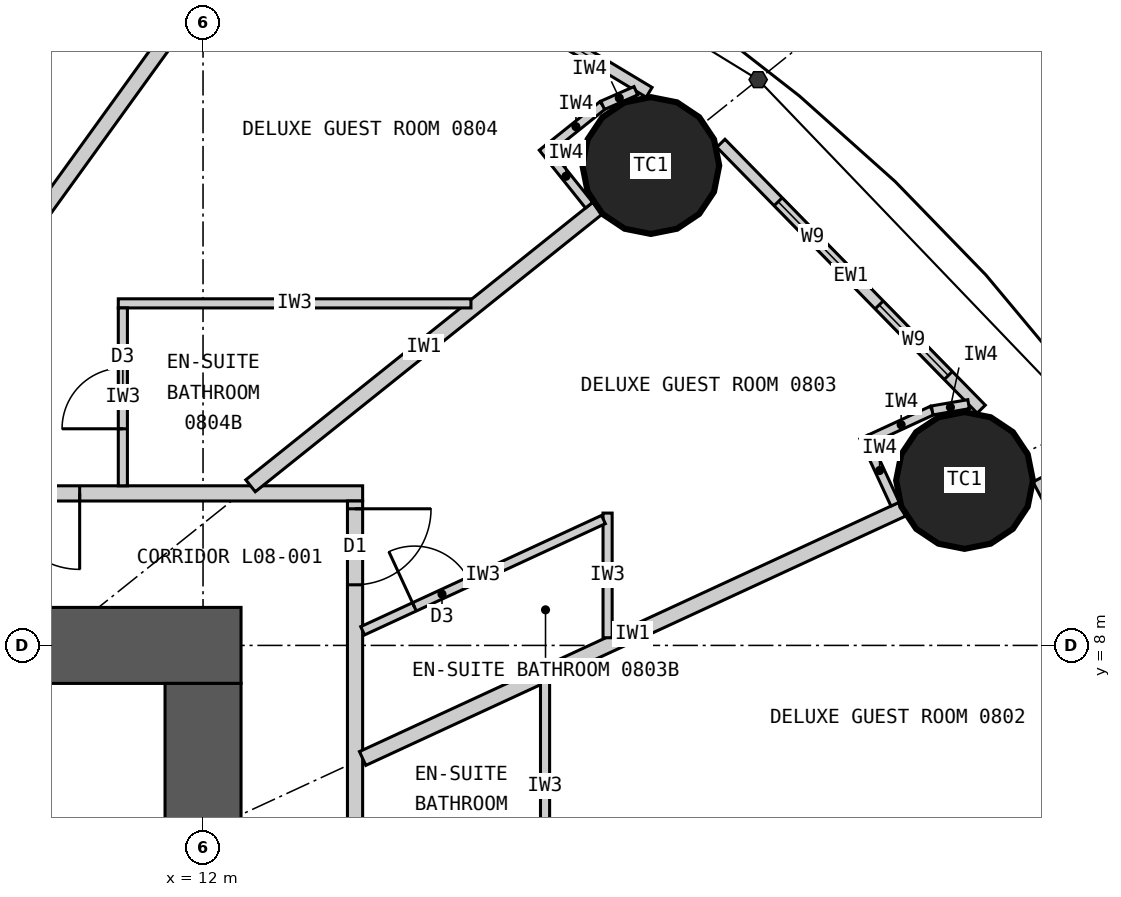
"""IFC4 building model, lengths in metres.
Left out: names, types, materials, properties, quantities, classifications, styles, units other than length and angle.
Written with IfcOpenShell. Run it as: python <this file> out.ifc"""

import sys

from ifc_helpers import new_model, si_unit, direction, frame, frame_2d, origin, origin_2d, place, context, subcontext, project, spatial, rectangle, circle, extrude, element, fill, save


model = new_model("IFC4")
c1 = context("Model", 3, precision=1e-05, world=origin(), true_north=direction((0.0, 1.0)))
c2 = subcontext(c1, "Body", "Model", "MODEL_VIEW")
j1 = project(units=[si_unit("LENGTHUNIT", "METRE"), si_unit("PLANEANGLEUNIT", "RADIAN")], contexts=[c1])
p1 = place(None, origin())
s1 = spatial("IfcSite", under=j1, at=p1, CompositionType="ELEMENT")
p2 = place(p1, origin())
s2 = spatial("IfcBuilding", under=s1, at=p2, CompositionType="ELEMENT")
p3 = place(p2, frame((0.0, 0.0, 39.3)))
s3 = spatial("IfcBuildingStorey", under=s2, at=p3, CompositionType="ELEMENT", Elevation=39.3)
for number, where, z_axis, x_axis in (
    (1, (22.019, 10.17, 0.0), (0.0, 0.0, 1.0), (1.0, 0.0, 0.0)),
    (2, (17.892, 14.313, 0.0), (0.0, 0.0, 1.0), (1.0, 0.0, 0.0)),
):
    element("IfcColumn", number, at=place(p3, frame(where, z_axis=z_axis, x_axis=x_axis)), inside=s3, PredefinedType="COLUMN", context=c2, shape_type="SweptSolid", body=[
        extrude(circle(Radius=0.9, at=origin_2d()), origin(), (0.0, 0.0, 1.0), 3.3),
    ])
p4 = place(p3, frame((-12.5, 8.0, 0.0), z_axis=(0.0, 0.0, 1.0), x_axis=(1.0, 0.0, 0.0)))
e3 = element("IfcWall", 3, at=p4, inside=s3, PredefinedType="SHEAR", context=c2, shape_type="SweptSolid", body=[
    extrude(rectangle(XDim=25.0, YDim=1.0, at=frame_2d((12.5, 0.0))), origin(), (0.0, 0.0, 1.0), 3.3),
])
p5 = place(p4, frame((11.2, 0.0, 0.0)))
e4 = element("IfcOpeningElement", 4, at=p5, cuts=e3, PredefinedType="OPENING", context=c2, shape_type="SweptSolid", body=[
    extrude(rectangle(XDim=1.2, YDim=2.2, at=frame_2d((0.6, 1.1))), frame((0.0, 0.51, 0.0), z_axis=(0.0, -1.0, 0.0), x_axis=(1.0, 0.0, 0.0)), (0.0, 0.0, 1.0), 1.02),
])
p6 = place(p4, frame((18.8, 0.0, 0.0)))
e5 = element("IfcOpeningElement", 5, at=p6, cuts=e3, PredefinedType="OPENING", context=c2, shape_type="SweptSolid", body=[
    extrude(rectangle(XDim=0.9, YDim=2.2, at=frame_2d((0.45, 1.1))), frame((0.0, 0.51, 0.0), z_axis=(0.0, -1.0, 0.0), x_axis=(1.0, 0.0, 0.0)), (0.0, 0.0, 1.0), 1.02),
])
p7 = place(p3, frame((12.0, -7.5, 0.0), z_axis=(0.0, 0.0, 1.0), x_axis=(0.0, 1.0, 0.0)))
e6 = element("IfcWall", 6, at=p7, inside=s3, PredefinedType="SHEAR", context=c2, shape_type="SweptSolid", body=[
    extrude(rectangle(XDim=15.0, YDim=1.0, at=frame_2d((7.5, 0.0))), origin(), (0.0, 0.0, 1.0), 3.3),
])
p8 = place(p7, frame((6.6, 0.0, 0.0)))
e7 = element("IfcOpeningElement", 7, at=p8, cuts=e6, PredefinedType="OPENING", context=c2, shape_type="SweptSolid", body=[
    extrude(rectangle(XDim=1.8, YDim=2.2, at=frame_2d((0.9, 1.1))), frame((0.0, 0.51, 0.0), z_axis=(0.0, -1.0, 0.0), x_axis=(1.0, 0.0, 0.0)), (0.0, 0.0, 1.0), 1.02),
])
p9 = place(p3, frame((25.139, 6.113, 0.0), z_axis=(0.0, 0.0, 1.0), x_axis=(-0.467303182954, 0.884097129959, 0.0)))
e8 = element("IfcWall", 8, at=p9, inside=s3, PredefinedType="ELEMENTEDWALL", context=c2, shape_type="SweptSolid", body=[
    extrude(rectangle(XDim=4.606, YDim=0.15, at=frame_2d((2.303, 0.0))), origin(), (0.0, 0.0, 1.0), 3.12),
])
p10 = place(p9, frame((0.531, 0.0, 0.9)))
e9 = element("IfcOpeningElement", 9, at=p10, cuts=e8, PredefinedType="OPENING", context=c2, shape_type="SweptSolid", body=[
    extrude(rectangle(XDim=1.3, YDim=1.9, at=frame_2d((0.65, 0.95))), frame((0.0, 0.085, 0.0), z_axis=(0.0, -1.0, 0.0), x_axis=(1.0, 0.0, 0.0)), (0.0, 0.0, 1.0), 0.17),
])
p11 = place(p9, frame((2.432, 0.0, 0.9)))
e10 = element("IfcOpeningElement", 10, at=p11, cuts=e8, PredefinedType="OPENING", context=c2, shape_type="SweptSolid", body=[
    extrude(rectangle(XDim=1.3, YDim=1.9, at=frame_2d((0.65, 0.95))), frame((0.0, 0.085, 0.0), z_axis=(0.0, -1.0, 0.0), x_axis=(1.0, 0.0, 0.0)), (0.0, 0.0, 1.0), 0.17),
])
p12 = place(p3, frame((22.239, 11.108, 0.0), z_axis=(0.0, 0.0, 1.0), x_axis=(-0.699612594083, 0.714522370679, 0.0)))
e11 = element("IfcWall", 11, at=p12, inside=s3, PredefinedType="ELEMENTEDWALL", context=c2, shape_type="SweptSolid", body=[
    extrude(rectangle(XDim=4.896, YDim=0.15, at=frame_2d((2.448, 0.0))), origin(), (0.0, 0.0, 1.0), 3.12),
])
p13 = place(p12, frame((0.619, 0.0, 0.9)))
e12 = element("IfcOpeningElement", 12, at=p13, cuts=e11, PredefinedType="OPENING", context=c2, shape_type="SweptSolid", body=[
    extrude(rectangle(XDim=1.3, YDim=1.9, at=frame_2d((0.65, 0.95))), frame((0.0, 0.085, 0.0), z_axis=(0.0, -1.0, 0.0), x_axis=(1.0, 0.0, 0.0)), (0.0, 0.0, 1.0), 0.17),
])
p14 = place(p12, frame((2.519, 0.0, 0.9)))
e13 = element("IfcOpeningElement", 13, at=p14, cuts=e11, PredefinedType="OPENING", context=c2, shape_type="SweptSolid", body=[
    extrude(rectangle(XDim=1.3, YDim=1.9, at=frame_2d((0.65, 0.95))), frame((0.0, 0.085, 0.0), z_axis=(0.0, -1.0, 0.0), x_axis=(1.0, 0.0, 0.0)), (0.0, 0.0, 1.0), 0.17),
])
p15 = place(p3, frame((17.869, 15.277, 0.0), z_axis=(0.0, 0.0, 1.0), x_axis=(-0.856958191554, 0.515385931054, 0.0)))
e14 = element("IfcWall", 14, at=p15, inside=s3, PredefinedType="ELEMENTEDWALL", context=c2, shape_type="SweptSolid", body=[
    extrude(rectangle(XDim=5.201, YDim=0.15, at=frame_2d((2.601, 0.0))), origin(), (0.0, 0.0, 1.0), 3.12),
])
p16 = place(p15, frame((0.776, 0.0, 0.9)))
e15 = element("IfcOpeningElement", 15, at=p16, cuts=e14, PredefinedType="OPENING", context=c2, shape_type="SweptSolid", body=[
    extrude(rectangle(XDim=1.3, YDim=1.9, at=frame_2d((0.65, 0.95))), frame((0.0, 0.085, 0.0), z_axis=(0.0, -1.0, 0.0), x_axis=(1.0, 0.0, 0.0)), (0.0, 0.0, 1.0), 0.17),
])
p17 = place(p15, frame((2.676, 0.0, 0.9)))
e16 = element("IfcOpeningElement", 16, at=p17, cuts=e14, PredefinedType="OPENING", context=c2, shape_type="SweptSolid", body=[
    extrude(rectangle(XDim=1.3, YDim=1.9, at=frame_2d((0.65, 0.95))), frame((0.0, 0.085, 0.0), z_axis=(0.0, -1.0, 0.0), x_axis=(1.0, 0.0, 0.0)), (0.0, 0.0, 1.0), 0.17),
])
p18 = place(p3, frame((-14.1, 10.0, 0.0), z_axis=(0.0, 0.0, 1.0), x_axis=(1.0, 0.0, 0.0)))
e17 = element("IfcWall", 17, at=p18, inside=s3, PredefinedType="PARTITIONING", context=c2, shape_type="SweptSolid", body=[
    extrude(rectangle(XDim=28.2, YDim=0.2, at=frame_2d((14.1, 0.0))), origin(), (0.0, 0.0, 1.0), 3.12),
])
p19 = place(p18, frame((23.477, 0.0, 0.0)))
e18 = element("IfcOpeningElement", 18, at=p19, cuts=e17, PredefinedType="OPENING", context=c2, shape_type="SweptSolid", body=[
    extrude(rectangle(XDim=1.0, YDim=2.2, at=frame_2d((0.5, 1.1))), frame((0.0, 0.11, 0.0), z_axis=(0.0, -1.0, 0.0), x_axis=(1.0, 0.0, 0.0)), (0.0, 0.0, 1.0), 0.22),
])
p20 = place(p18, frame((18.529, 0.0, 0.0)))
e19 = element("IfcOpeningElement", 19, at=p20, cuts=e17, PredefinedType="OPENING", context=c2, shape_type="SweptSolid", body=[
    extrude(rectangle(XDim=1.0, YDim=2.2, at=frame_2d((0.5, 1.1))), frame((0.0, 0.11, 0.0), z_axis=(0.0, -1.0, 0.0), x_axis=(1.0, 0.0, 0.0)), (0.0, 0.0, 1.0), 0.22),
])
p21 = place(p18, frame((14.623, 0.0, 0.0)))
e20 = element("IfcOpeningElement", 20, at=p21, cuts=e17, PredefinedType="OPENING", context=c2, shape_type="SweptSolid", body=[
    extrude(rectangle(XDim=1.0, YDim=2.2, at=frame_2d((0.5, 1.1))), frame((0.0, 0.11, 0.0), z_axis=(0.0, -1.0, 0.0), x_axis=(1.0, 0.0, 0.0)), (0.0, 0.0, 1.0), 0.22),
])
p22 = place(p18, frame((11.252, 0.0, 0.0)))
e21 = element("IfcOpeningElement", 21, at=p22, cuts=e17, PredefinedType="OPENING", context=c2, shape_type="SweptSolid", body=[
    extrude(rectangle(XDim=1.0, YDim=2.1, at=frame_2d((0.5, 1.05))), frame((0.0, 0.11, 0.0), z_axis=(0.0, -1.0, 0.0), x_axis=(1.0, 0.0, 0.0)), (0.0, 0.0, 1.0), 0.22),
])
p23 = place(p18, frame((8.671, 0.0, 0.0)))
e22 = element("IfcOpeningElement", 22, at=p23, cuts=e17, PredefinedType="OPENING", context=c2, shape_type="SweptSolid", body=[
    extrude(rectangle(XDim=1.0, YDim=2.2, at=frame_2d((0.5, 1.1))), frame((0.0, 0.11, 0.0), z_axis=(0.0, -1.0, 0.0), x_axis=(1.0, 0.0, 0.0)), (0.0, 0.0, 1.0), 0.22),
])
p24 = place(p18, frame((1.616, 0.0, 0.0)))
e23 = element("IfcOpeningElement", 23, at=p24, cuts=e17, PredefinedType="OPENING", context=c2, shape_type="SweptSolid", body=[
    extrude(rectangle(XDim=1.0, YDim=2.2, at=frame_2d((0.5, 1.1))), frame((0.0, 0.11, 0.0), z_axis=(0.0, -1.0, 0.0), x_axis=(1.0, 0.0, 0.0)), (0.0, 0.0, 1.0), 0.22),
])
p25 = place(p3, frame((14.0, -9.9, 0.0), z_axis=(0.0, 0.0, 1.0), x_axis=(0.0, 1.0, 0.0)))
e24 = element("IfcWall", 24, at=p25, inside=s3, PredefinedType="PARTITIONING", context=c2, shape_type="SweptSolid", body=[
    extrude(rectangle(XDim=19.8, YDim=0.2, at=frame_2d((9.9, 0.0))), origin(), (0.0, 0.0, 1.0), 3.12),
])
p26 = place(p25, frame((11.698, 0.0, 0.0)))
e25 = element("IfcOpeningElement", 25, at=p26, cuts=e24, PredefinedType="OPENING", context=c2, shape_type="SweptSolid", body=[
    extrude(rectangle(XDim=1.0, YDim=2.2, at=frame_2d((0.5, 1.1))), frame((0.0, 0.11, 0.0), z_axis=(0.0, -1.0, 0.0), x_axis=(1.0, 0.0, 0.0)), (0.0, 0.0, 1.0), 0.22),
])
p27 = place(p25, frame((13.554, 0.0, 0.0)))
e26 = element("IfcOpeningElement", 26, at=p27, cuts=e24, PredefinedType="OPENING", context=c2, shape_type="SweptSolid", body=[
    extrude(rectangle(XDim=1.0, YDim=2.0, at=frame_2d((0.5, 1.0))), frame((0.0, 0.11, 0.0), z_axis=(0.0, -1.0, 0.0), x_axis=(1.0, 0.0, 0.0)), (0.0, 0.0, 1.0), 0.22),
])
p28 = place(p25, frame((18.698, 0.0, 0.0)))
e27 = element("IfcOpeningElement", 27, at=p28, cuts=e24, PredefinedType="OPENING", context=c2, shape_type="SweptSolid", body=[
    extrude(rectangle(XDim=1.0, YDim=2.2, at=frame_2d((0.5, 1.1))), frame((0.0, 0.11, 0.0), z_axis=(0.0, -1.0, 0.0), x_axis=(1.0, 0.0, 0.0)), (0.0, 0.0, 1.0), 0.22),
])
p29 = place(p25, frame((0.975, 0.0, 0.0)))
e28 = element("IfcOpeningElement", 28, at=p29, cuts=e24, PredefinedType="OPENING", context=c2, shape_type="SweptSolid", body=[
    extrude(rectangle(XDim=1.0, YDim=2.2, at=frame_2d((0.5, 1.1))), frame((0.0, 0.11, 0.0), z_axis=(0.0, -1.0, 0.0), x_axis=(1.0, 0.0, 0.0)), (0.0, 0.0, 1.0), 0.22),
])
p30 = place(p25, frame((7.097, 0.0, 0.0)))
e29 = element("IfcOpeningElement", 29, at=p30, cuts=e24, PredefinedType="OPENING", context=c2, shape_type="SweptSolid", body=[
    extrude(rectangle(XDim=1.0, YDim=2.2, at=frame_2d((0.5, 1.1))), frame((0.0, 0.11, 0.0), z_axis=(0.0, -1.0, 0.0), x_axis=(1.0, 0.0, 0.0)), (0.0, 0.0, 1.0), 0.22),
])
p31 = place(p3, frame((14.1, 6.512, 0.0), z_axis=(0.0, 0.0, 1.0), x_axis=(0.907842433118, 0.41931147925, 0.0)))
e30 = element("IfcWall", 30, at=p31, inside=s3, PredefinedType="PARTITIONING", context=c2, shape_type="SweptSolid", body=[
    extrude(rectangle(XDim=7.823, YDim=0.2, at=frame_2d((3.912, 0.0))), origin(), (0.0, 0.0, 1.0), 2.32),
])
p32 = place(p3, frame((12.625, 10.1, 0.0), z_axis=(0.0, 0.0, 1.0), x_axis=(0.780872884676, 0.624689953479, 0.0)))
e31 = element("IfcWall", 31, at=p32, inside=s3, PredefinedType="PARTITIONING", context=c2, shape_type="SweptSolid", body=[
    extrude(rectangle(XDim=5.845, YDim=0.2, at=frame_2d((2.922, 0.0))), origin(), (0.0, 0.0, 1.0), 2.32),
])
p33 = place(p3, frame((7.289, 10.1, 0.0), z_axis=(0.0, 0.0, 1.0), x_axis=(0.585216319319, 0.810877216108, 0.0)))
e32 = element("IfcWall", 32, at=p33, inside=s3, PredefinedType="PARTITIONING", context=c2, shape_type="SweptSolid", body=[
    extrude(rectangle(XDim=8.16, YDim=0.2, at=frame_2d((4.08, 0.0))), origin(), (0.0, 0.0, 1.0), 2.32),
])
p34 = place(p3, frame((16.5, 7.521, 0.0), z_axis=(0.0, 0.0, 1.0), x_axis=(0.0, -1.0, 0.0)))
e33 = element("IfcWall", 33, at=p34, inside=s3, PredefinedType="PARTITIONING", context=c2, shape_type="SweptSolid", body=[
    extrude(rectangle(XDim=2.749, YDim=0.12, at=frame_2d((1.374, 0.0))), origin(), (0.0, 0.0, 1.0), 3.12),
])
p35 = place(p3, frame((17.323, 8.101, 0.0), z_axis=(0.0, 0.0, 1.0), x_axis=(0.0, 1.0, 0.0)))
e34 = element("IfcWall", 34, at=p35, inside=s3, PredefinedType="PARTITIONING", context=c2, shape_type="SweptSolid", body=[
    extrude(rectangle(XDim=1.64, YDim=0.12, at=frame_2d((0.82, 0.0))), origin(), (0.0, 0.0, 1.0), 3.12),
])
p36 = place(p3, frame((14.1, 8.193, 0.0), z_axis=(0.0, 0.0, 1.0), x_axis=(0.907836493557, 0.419324338628, 0.0)))
e35 = element("IfcWall", 35, at=p36, inside=s3, PredefinedType="PARTITIONING", context=c2, shape_type="SweptSolid", body=[
    extrude(rectangle(XDim=3.49, YDim=0.12, at=frame_2d((1.745, 0.0))), origin(), (0.0, 0.0, 1.0), 3.12),
])
p37 = place(p36, frame((0.75, 0.0, 0.0)))
e36 = element("IfcOpeningElement", 36, at=p37, cuts=e35, PredefinedType="OPENING", context=c2, shape_type="SweptSolid", body=[
    extrude(rectangle(XDim=0.8, YDim=2.1, at=frame_2d((0.4, 1.05))), frame((0.0, 0.07, 0.0), z_axis=(0.0, -1.0, 0.0), x_axis=(1.0, 0.0, 0.0)), (0.0, 0.0, 1.0), 0.14),
])
p38 = place(p3, frame((15.525, 12.5, 0.0), z_axis=(0.0, 0.0, 1.0), x_axis=(-1.0, 0.0, 0.0)))
e37 = element("IfcWall", 37, at=p38, inside=s3, PredefinedType="PARTITIONING", context=c2, shape_type="SweptSolid", body=[
    extrude(rectangle(XDim=4.64, YDim=0.12, at=frame_2d((2.32, 0.0))), origin(), (0.0, 0.0, 1.0), 3.12),
])
p39 = place(p3, frame((10.945, 10.1, 0.0), z_axis=(0.0, 0.0, 1.0), x_axis=(0.0, 1.0, 0.0)))
e38 = element("IfcWall", 38, at=p39, inside=s3, PredefinedType="PARTITIONING", context=c2, shape_type="SweptSolid", body=[
    extrude(rectangle(XDim=2.34, YDim=0.12, at=frame_2d((1.17, 0.0))), origin(), (0.0, 0.0, 1.0), 3.12),
])
p40 = place(p39, frame((0.75, 0.0, 0.0)))
e39 = element("IfcOpeningElement", 39, at=p40, cuts=e38, PredefinedType="OPENING", context=c2, shape_type="SweptSolid", body=[
    extrude(rectangle(XDim=0.8, YDim=2.1, at=frame_2d((0.4, 1.05))), frame((0.0, 0.07, 0.0), z_axis=(0.0, -1.0, 0.0), x_axis=(1.0, 0.0, 0.0)), (0.0, 0.0, 1.0), 0.14),
])
p41 = place(p3, frame((21.106, 9.858, 0.0), z_axis=(0.0, 0.0, 1.0), x_axis=(-0.419344098106, 0.907827366509, 0.0)))
e40 = element("IfcWall", 40, at=p41, inside=s3, PredefinedType="PARTITIONING", context=c2, shape_type="SweptSolid", body=[
    extrude(rectangle(XDim=0.975, YDim=0.12, at=frame_2d((0.487, 0.0))), origin(), (0.0, 0.0, 1.0), 3.12),
])
p42 = place(p3, frame((20.777, 10.714, 0.0), z_axis=(0.0, 0.0, 1.0), x_axis=(0.907832324198, 0.419333365166, 0.0)))
e41 = element("IfcWall", 41, at=p42, inside=s3, PredefinedType="PARTITIONING", context=c2, shape_type="SweptSolid", body=[
    extrude(rectangle(XDim=0.9, YDim=0.12, at=frame_2d((0.45, 0.0))), origin(), (0.0, 0.0, 1.0), 3.12),
])
p43 = place(p3, frame((21.594, 11.091, 0.0), z_axis=(0.0, 0.0, 1.0), x_axis=(0.985483306792, 0.169772353566, 0.0)))
e42 = element("IfcWall", 42, at=p43, inside=s3, PredefinedType="PARTITIONING", context=c2, shape_type="SweptSolid", body=[
    extrude(rectangle(XDim=0.486, YDim=0.12, at=frame_2d((0.243, 0.0))), origin(), (0.0, 0.0, 1.0), 3.12),
])
p44 = place(p3, frame((17.08, 13.792, 0.0), z_axis=(0.0, 0.0, 1.0), x_axis=(-0.624756144097, 0.780819928289, 0.0)))
e43 = element("IfcWall", 43, at=p44, inside=s3, PredefinedType="PARTITIONING", context=c2, shape_type="SweptSolid", body=[
    extrude(rectangle(XDim=0.975, YDim=0.12, at=frame_2d((0.487, 0.0))), origin(), (0.0, 0.0, 1.0), 3.12),
])
p45 = place(p3, frame((16.555, 14.543, 0.0), z_axis=(0.0, 0.0, 1.0), x_axis=(0.780789399477, 0.62479429708, 0.0)))
e44 = element("IfcWall", 44, at=p45, inside=s3, PredefinedType="PARTITIONING", context=c2, shape_type="SweptSolid", body=[
    extrude(rectangle(XDim=0.9, YDim=0.12, at=frame_2d((0.45, 0.0))), origin(), (0.0, 0.0, 1.0), 3.12),
])
p46 = place(p3, frame((17.258, 15.106, 0.0), z_axis=(0.0, 0.0, 1.0), x_axis=(0.916098562583, 0.400953143937, 0.0)))
e45 = element("IfcWall", 45, at=p46, inside=s3, PredefinedType="PARTITIONING", context=c2, shape_type="SweptSolid", body=[
    extrude(rectangle(XDim=0.477, YDim=0.12, at=frame_2d((0.238, 0.0))), origin(), (0.0, 0.0, 1.0), 3.12),
])
p47 = place(p13, origin())
e46 = element("IfcWindow", 46, at=p47, inside=s3, PartitioningType="SINGLE_PANEL", PredefinedType="WINDOW", context=c2, shape_type="SweptSolid", body=[
    extrude(rectangle(XDim=1.3, YDim=1.9, at=frame_2d((0.65, 0.95))), frame((0.0, 0.03, 0.0), z_axis=(0.0, -1.0, 0.0), x_axis=(1.0, 0.0, 0.0)), (0.0, 0.0, 1.0), 0.06),
])
fill(e12, e46)
p48 = place(p14, origin())
e47 = element("IfcWindow", 47, at=p48, inside=s3, PartitioningType="SINGLE_PANEL", PredefinedType="WINDOW", context=c2, shape_type="SweptSolid", body=[
    extrude(rectangle(XDim=1.3, YDim=1.9, at=frame_2d((0.65, 0.95))), frame((0.0, 0.03, 0.0), z_axis=(0.0, -1.0, 0.0), x_axis=(1.0, 0.0, 0.0)), (0.0, 0.0, 1.0), 0.06),
])
fill(e13, e47)
p49 = place(p16, origin())
e48 = element("IfcWindow", 48, at=p49, inside=s3, PartitioningType="SINGLE_PANEL", PredefinedType="WINDOW", context=c2, shape_type="SweptSolid", body=[
    extrude(rectangle(XDim=1.3, YDim=1.9, at=frame_2d((0.65, 0.95))), frame((0.0, 0.03, 0.0), z_axis=(0.0, -1.0, 0.0), x_axis=(1.0, 0.0, 0.0)), (0.0, 0.0, 1.0), 0.06),
])
fill(e15, e48)
p50 = place(p37, origin())
e49 = element("IfcDoor", 49, at=p50, inside=s3, OperationType="SINGLE_SWING_LEFT", PredefinedType="DOOR", context=c2, shape_type="SweptSolid", body=[
    extrude(rectangle(XDim=0.8, YDim=2.1, at=frame_2d((0.4, 1.05))), frame((0.0, 0.025, 0.0), z_axis=(0.0, -1.0, 0.0), x_axis=(1.0, 0.0, 0.0)), (0.0, 0.0, 1.0), 0.05),
])
fill(e36, e49)
p51 = place(p28, origin())
e50 = element("IfcDoor", 50, at=p51, inside=s3, OperationType="SINGLE_SWING_RIGHT", PredefinedType="DOOR", context=c2, shape_type="SweptSolid", body=[
    extrude(rectangle(XDim=1.0, YDim=2.2, at=frame_2d((0.5, 1.1))), frame((0.0, 0.025, 0.0), z_axis=(0.0, -1.0, 0.0), x_axis=(1.0, 0.0, 0.0)), (0.0, 0.0, 1.0), 0.05),
])
fill(e27, e50)
p52 = place(p40, origin())
e51 = element("IfcDoor", 51, at=p52, inside=s3, OperationType="SINGLE_SWING_LEFT", PredefinedType="DOOR", context=c2, shape_type="SweptSolid", body=[
    extrude(rectangle(XDim=0.8, YDim=2.1, at=frame_2d((0.4, 1.05))), frame((0.0, 0.025, 0.0), z_axis=(0.0, -1.0, 0.0), x_axis=(1.0, 0.0, 0.0)), (0.0, 0.0, 1.0), 0.05),
])
fill(e39, e51)
p53 = place(p19, origin())
e52 = element("IfcDoor", 52, at=p53, inside=s3, OperationType="SINGLE_SWING_RIGHT", PredefinedType="DOOR", context=c2, shape_type="SweptSolid", body=[
    extrude(rectangle(XDim=1.0, YDim=2.2, at=frame_2d((0.5, 1.1))), frame((0.0, 0.025, 0.0), z_axis=(0.0, -1.0, 0.0), x_axis=(1.0, 0.0, 0.0)), (0.0, 0.0, 1.0), 0.05),
])
fill(e18, e52)
save(model, sys.argv[1])
